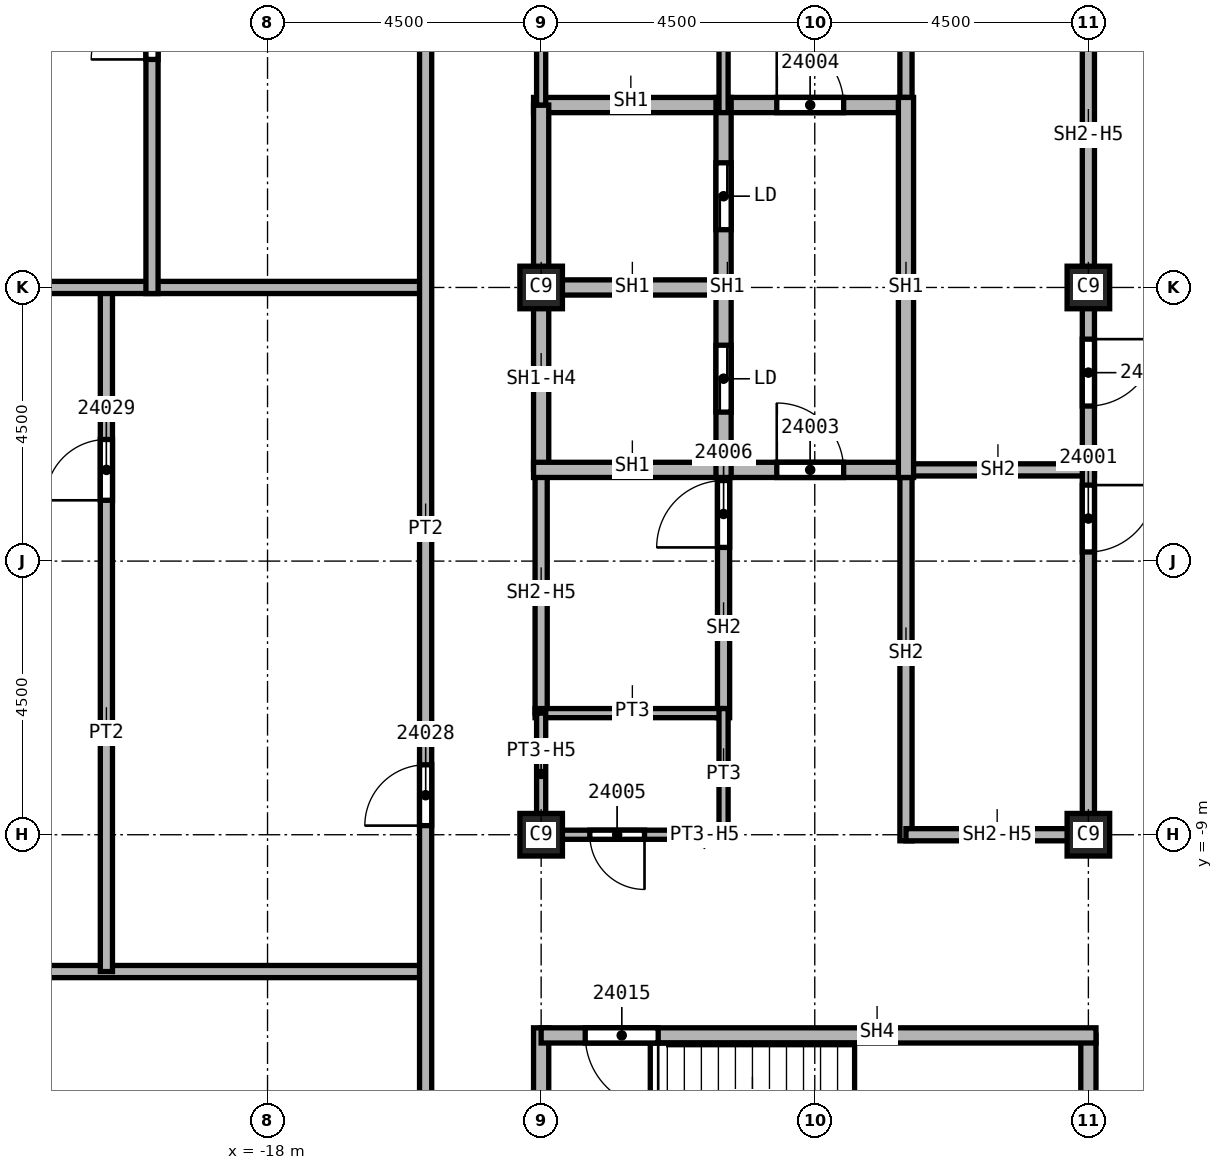
"""IFC4 building model, lengths in metres.
Left out: names, types, materials, properties, quantities, classifications, styles, units other than length and angle.
Written with IfcOpenShell. Run it as: python <this file> out.ifc"""

import sys

from ifc_helpers import new_model, si_unit, direction, frame, frame_2d, origin, origin_2d, place, context, subcontext, project, spatial, rectangle, extrude, element, fill, save


model = new_model("IFC4")
c1 = context("Model", 3, precision=1e-05, world=origin(), true_north=direction((0.0, 1.0)))
c2 = subcontext(c1, "Body", "Model", "MODEL_VIEW")
j1 = project(units=[si_unit("LENGTHUNIT", "METRE"), si_unit("PLANEANGLEUNIT", "RADIAN")], contexts=[c1])
p1 = place(None, origin())
s1 = spatial("IfcSite", under=j1, at=p1, CompositionType="ELEMENT")
p2 = place(p1, origin())
s2 = spatial("IfcBuilding", under=s1, at=p2, CompositionType="ELEMENT")
p3 = place(p2, frame((0.0, 0.0, 346.0)))
s3 = spatial("IfcBuildingStorey", under=s2, at=p3, CompositionType="ELEMENT", Elevation=346.0)
for number, where, z_axis, x_axis in (
    (1, (-4.5, 0.0, 0.0), (0.0, 0.0, 1.0), (1.0, 0.0, 0.0)),
    (2, (-4.5, -9.0, 0.0), (0.0, 0.0, 1.0), (1.0, 0.0, 0.0)),
    (3, (-13.5, 0.0, 0.0), (0.0, 0.0, 1.0), (1.0, 0.0, 0.0)),
    (4, (-13.5, -9.0, 0.0), (0.0, 0.0, 1.0), (1.0, 0.0, 0.0)),
):
    element("IfcColumn", number, at=place(p3, frame(where, z_axis=z_axis, x_axis=x_axis)), inside=s3, PredefinedType="COLUMN", context=c2, shape_type="SweptSolid", body=[
        extrude(rectangle(XDim=0.7, YDim=0.7, at=origin_2d()), origin(), (0.0, 0.0, 1.0), 3.59),
    ])
p4 = place(p3, frame((-26.55, -11.25, 0.0), z_axis=(0.0, 0.0, 1.0), x_axis=(1.0, 0.0, 0.0)))
e5 = element("IfcWall", 5, at=p4, inside=s3, PredefinedType="PARTITIONING", context=c2, shape_type="SweptSolid", body=[
    extrude(rectangle(XDim=11.15, YDim=0.2, at=frame_2d((5.575, 0.0))), origin(), (0.0, 0.0, 1.0), 3.59),
])
p5 = place(p3, frame((-20.65, -11.25, 0.0), z_axis=(0.0, 0.0, 1.0), x_axis=(0.0, 1.0, 0.0)))
e6 = element("IfcWall", 6, at=p5, inside=s3, PredefinedType="PARTITIONING", context=c2, shape_type="SweptSolid", body=[
    extrude(rectangle(XDim=11.25, YDim=0.2, at=frame_2d((5.625, 0.0))), origin(), (0.0, 0.0, 1.0), 3.59),
])
p6 = place(p5, frame((7.75, 0.0, 0.0)))
e7 = element("IfcOpeningElement", 7, at=p6, cuts=e6, PredefinedType="OPENING", context=c2, shape_type="SweptSolid", body=[
    extrude(rectangle(XDim=1.0, YDim=2.1, at=frame_2d((0.5, 1.05))), frame((0.0, 0.1, 0.0), z_axis=(0.0, -1.0, 0.0), x_axis=(1.0, 0.0, 0.0)), (0.0, 0.0, 1.0), 0.2),
])
p7 = place(p3, frame((-15.4, 0.0, 0.0), z_axis=(0.0, 0.0, 1.0), x_axis=(-1.0, 0.0, 0.0)))
e8 = element("IfcWall", 8, at=p7, inside=s3, PredefinedType="PARTITIONING", context=c2, shape_type="SweptSolid", body=[
    extrude(rectangle(XDim=11.15, YDim=0.2, at=frame_2d((5.575, 0.0))), origin(), (0.0, 0.0, 1.0), 3.59),
])
p8 = place(p3, frame((-19.9, -0.1, 0.0), z_axis=(0.0, 0.0, 1.0), x_axis=(0.0, 1.0, 0.0)))
e9 = element("IfcWall", 9, at=p8, inside=s3, PredefinedType="PARTITIONING", context=c2, shape_type="SweptSolid", body=[
    extrude(rectangle(XDim=13.6, YDim=0.2, at=frame_2d((6.8, 0.0))), origin(), (0.0, 0.0, 1.0), 3.59),
])
p9 = place(p8, frame((3.85, 0.0, 0.0)))
e10 = element("IfcOpeningElement", 10, at=p9, cuts=e9, PredefinedType="OPENING", context=c2, shape_type="SweptSolid", body=[
    extrude(rectangle(XDim=1.0, YDim=2.1, at=frame_2d((0.5, 1.05))), frame((0.0, 0.1, 0.0), z_axis=(0.0, -1.0, 0.0), x_axis=(1.0, 0.0, 0.0)), (0.0, 0.0, 1.0), 0.2),
])
p10 = place(p3, frame((-15.4, -24.95, 0.0), z_axis=(0.0, 0.0, 1.0), x_axis=(0.0, 1.0, 0.0)))
e11 = element("IfcWall", 11, at=p10, inside=s3, PredefinedType="PARTITIONING", context=c2, shape_type="SweptSolid", body=[
    extrude(rectangle(XDim=38.55, YDim=0.2, at=frame_2d((19.275, 0.0))), origin(), (0.0, 0.0, 1.0), 3.59),
])
p11 = place(p10, frame((30.5, 0.0, 0.0)))
e12 = element("IfcOpeningElement", 12, at=p11, cuts=e11, PredefinedType="OPENING", context=c2, shape_type="SweptSolid", body=[
    extrude(rectangle(XDim=1.0, YDim=2.1, at=frame_2d((0.5, 1.05))), frame((0.0, 0.1, 0.0), z_axis=(0.0, -1.0, 0.0), x_axis=(1.0, 0.0, 0.0)), (0.0, 0.0, 1.0), 0.2),
])
p12 = place(p10, frame((36.35, 0.0, 0.0)))
e13 = element("IfcOpeningElement", 13, at=p12, cuts=e11, PredefinedType="OPENING", context=c2, shape_type="SweptSolid", body=[
    extrude(rectangle(XDim=1.0, YDim=2.1, at=frame_2d((0.5, 1.05))), frame((0.0, 0.1, 0.0), z_axis=(0.0, -1.0, 0.0), x_axis=(1.0, 0.0, 0.0)), (0.0, 0.0, 1.0), 0.2),
])
p13 = place(p10, frame((1.9, 0.0, 0.0)))
e14 = element("IfcOpeningElement", 14, at=p13, cuts=e11, PredefinedType="OPENING", context=c2, shape_type="SweptSolid", body=[
    extrude(rectangle(XDim=1.0, YDim=2.1, at=frame_2d((0.5, 1.05))), frame((0.0, 0.1, 0.0), z_axis=(0.0, -1.0, 0.0), x_axis=(1.0, 0.0, 0.0)), (0.0, 0.0, 1.0), 0.2),
])
p14 = place(p10, frame((5.6, 0.0, 0.0)))
e15 = element("IfcOpeningElement", 15, at=p14, cuts=e11, PredefinedType="OPENING", context=c2, shape_type="SweptSolid", body=[
    extrude(rectangle(XDim=1.0, YDim=2.1, at=frame_2d((0.5, 1.05))), frame((0.0, 0.1, 0.0), z_axis=(0.0, -1.0, 0.0), x_axis=(1.0, 0.0, 0.0)), (0.0, 0.0, 1.0), 0.2),
])
p15 = place(p10, frame((9.35, 0.0, 0.0)))
e16 = element("IfcOpeningElement", 16, at=p15, cuts=e11, PredefinedType="OPENING", context=c2, shape_type="SweptSolid", body=[
    extrude(rectangle(XDim=1.0, YDim=2.1, at=frame_2d((0.5, 1.05))), frame((0.0, 0.1, 0.0), z_axis=(0.0, -1.0, 0.0), x_axis=(1.0, 0.0, 0.0)), (0.0, 0.0, 1.0), 0.2),
])
p16 = place(p10, frame((16.1, 0.0, 0.0)))
e17 = element("IfcOpeningElement", 17, at=p16, cuts=e11, PredefinedType="OPENING", context=c2, shape_type="SweptSolid", body=[
    extrude(rectangle(XDim=1.0, YDim=2.1, at=frame_2d((0.5, 1.05))), frame((0.0, 0.1, 0.0), z_axis=(0.0, -1.0, 0.0), x_axis=(1.0, 0.0, 0.0)), (0.0, 0.0, 1.0), 0.2),
])
p17 = place(p3, frame((-13.5, -7.0, 0.0), z_axis=(0.0, 0.0, 1.0), x_axis=(0.0, 1.0, 0.0)))
e18 = element("IfcWall", 18, at=p17, inside=s3, PredefinedType="SOLIDWALL", context=c2, shape_type="SweptSolid", body=[
    extrude(rectangle(XDim=4.0, YDim=0.2, at=frame_2d((2.0, 0.0))), origin(), (0.0, 0.0, 1.0), 2.828),
])
p18 = place(p3, frame((-10.5, -7.075, 0.0), z_axis=(0.0, 0.0, 1.0), x_axis=(0.0, 1.0, 0.0)))
e19 = element("IfcWall", 19, at=p18, inside=s3, PredefinedType="SOLIDWALL", context=c2, shape_type="SweptSolid", body=[
    extrude(rectangle(XDim=4.2, YDim=0.2, at=frame_2d((2.1, 0.0))), origin(), (0.0, 0.0, 1.0), 3.59),
])
p19 = place(p18, frame((2.8, 0.0, 0.0)))
e20 = element("IfcOpeningElement", 20, at=p19, cuts=e19, PredefinedType="OPENING", context=c2, shape_type="SweptSolid", body=[
    extrude(rectangle(XDim=1.1, YDim=2.1, at=frame_2d((0.55, 1.05))), frame((0.0, 0.1, 0.0), z_axis=(0.0, -1.0, 0.0), x_axis=(1.0, 0.0, 0.0)), (0.0, 0.0, 1.0), 0.2),
])
p20 = place(p3, frame((-7.625, -3.0, 0.0), z_axis=(0.0, 0.0, 1.0), x_axis=(1.0, 0.0, 0.0)))
e21 = element("IfcWall", 21, at=p20, inside=s3, PredefinedType="SOLIDWALL", context=c2, shape_type="SweptSolid", body=[
    extrude(rectangle(XDim=3.225, YDim=0.2, at=frame_2d((1.613, 0.0))), origin(), (0.0, 0.0, 1.0), 3.59),
])
p21 = place(p3, frame((-7.5, -9.1, 0.0), z_axis=(0.0, 0.0, 1.0), x_axis=(0.0, 1.0, 0.0)))
e22 = element("IfcWall", 22, at=p21, inside=s3, PredefinedType="SOLIDWALL", context=c2, shape_type="SweptSolid", body=[
    extrude(rectangle(XDim=6.225, YDim=0.2, at=frame_2d((3.113, 0.0))), origin(), (0.0, 0.0, 1.0), 3.59),
])
p22 = place(p3, frame((-7.5, 2.875, 0.0), z_axis=(0.0, 0.0, 1.0), x_axis=(0.0, 1.0, 0.0)))
e23 = element("IfcWall", 23, at=p22, inside=s3, PredefinedType="SOLIDWALL", context=c2, shape_type="SweptSolid", body=[
    extrude(rectangle(XDim=3.125, YDim=0.2, at=frame_2d((1.562, 0.0))), origin(), (0.0, 0.0, 1.0), 3.59),
])
p23 = place(p3, frame((-4.5, -9.0, 0.0), z_axis=(0.0, 0.0, 1.0), x_axis=(-1.0, 0.0, 0.0)))
e24 = element("IfcWall", 24, at=p23, inside=s3, PredefinedType="SOLIDWALL", context=c2, shape_type="SweptSolid", body=[
    extrude(rectangle(XDim=3.0, YDim=0.2, at=frame_2d((1.5, 0.0))), origin(), (0.0, 0.0, 1.0), 2.828),
])
p24 = place(p3, frame((-4.5, 6.0, 0.0), z_axis=(0.0, 0.0, 1.0), x_axis=(0.0, -1.0, 0.0)))
e25 = element("IfcWall", 25, at=p24, inside=s3, PredefinedType="SOLIDWALL", context=c2, shape_type="SweptSolid", body=[
    extrude(rectangle(XDim=15.1, YDim=0.2, at=frame_2d((7.55, 0.0))), origin(), (0.0, 0.0, 1.0), 2.828),
])
p25 = place(p24, frame((9.25, 0.0, 0.0)))
e26 = element("IfcOpeningElement", 26, at=p25, cuts=e25, PredefinedType="OPENING", context=c2, shape_type="SweptSolid", body=[
    extrude(rectangle(XDim=1.1, YDim=2.1, at=frame_2d((0.55, 1.05))), frame((0.0, 0.1, 0.0), z_axis=(0.0, -1.0, 0.0), x_axis=(1.0, 0.0, 0.0)), (0.0, 0.0, 1.0), 0.2),
])
p26 = place(p24, frame((6.85, 0.0, 0.0)))
e27 = element("IfcOpeningElement", 27, at=p26, cuts=e25, PredefinedType="OPENING", context=c2, shape_type="SweptSolid", body=[
    extrude(rectangle(XDim=1.1, YDim=2.1, at=frame_2d((0.55, 1.05))), frame((0.0, 0.1, 0.0), z_axis=(0.0, -1.0, 0.0), x_axis=(1.0, 0.0, 0.0)), (0.0, 0.0, 1.0), 0.2),
])
p27 = place(p3, frame((-13.625, 0.0, 0.0), z_axis=(0.0, 0.0, 1.0), x_axis=(1.0, 0.0, 0.0)))
e28 = element("IfcWall", 28, at=p27, inside=s3, PredefinedType="SOLIDWALL", context=c2, shape_type="SweptSolid", body=[
    extrude(rectangle(XDim=3.125, YDim=0.25, at=frame_2d((1.562, 0.0))), origin(), (0.0, 0.0, 1.0), 3.59),
])
p28 = place(p3, frame((-13.625, 3.0, 0.0), z_axis=(0.0, 0.0, 1.0), x_axis=(1.0, 0.0, 0.0)))
e29 = element("IfcWall", 29, at=p28, inside=s3, PredefinedType="SOLIDWALL", context=c2, shape_type="SweptSolid", body=[
    extrude(rectangle(XDim=6.125, YDim=0.25, at=frame_2d((3.062, 0.0))), origin(), (0.0, 0.0, 1.0), 3.59),
])
p29 = place(p28, frame((4.0, 0.0, 0.0)))
e30 = element("IfcOpeningElement", 30, at=p29, cuts=e29, PredefinedType="OPENING", context=c2, shape_type="SweptSolid", body=[
    extrude(rectangle(XDim=1.1, YDim=2.1, at=frame_2d((0.55, 1.05))), frame((0.0, 0.125, 0.0), z_axis=(0.0, -1.0, 0.0), x_axis=(1.0, 0.0, 0.0)), (0.0, 0.0, 1.0), 0.25),
])
p30 = place(p3, frame((-13.5, -3.0, 0.0), z_axis=(0.0, 0.0, 1.0), x_axis=(0.0, 1.0, 0.0)))
e31 = element("IfcWall", 31, at=p30, inside=s3, PredefinedType="SOLIDWALL", context=c2, shape_type="SweptSolid", body=[
    extrude(rectangle(XDim=6.0, YDim=0.25, at=frame_2d((3.0, 0.0))), origin(), (0.0, 0.0, 1.0), 2.828),
])
p31 = place(p3, frame((-13.625, -3.0, 0.0), z_axis=(0.0, 0.0, 1.0), x_axis=(1.0, 0.0, 0.0)))
e32 = element("IfcWall", 32, at=p31, inside=s3, PredefinedType="SOLIDWALL", context=c2, shape_type="SweptSolid", body=[
    extrude(rectangle(XDim=6.125, YDim=0.25, at=frame_2d((3.062, 0.0))), origin(), (0.0, 0.0, 1.0), 3.59),
])
p32 = place(p31, frame((4.0, 0.0, 0.0)))
e33 = element("IfcOpeningElement", 33, at=p32, cuts=e32, PredefinedType="OPENING", context=c2, shape_type="SweptSolid", body=[
    extrude(rectangle(XDim=1.1, YDim=2.1, at=frame_2d((0.55, 1.05))), frame((0.0, 0.125, 0.0), z_axis=(0.0, -1.0, 0.0), x_axis=(1.0, 0.0, 0.0)), (0.0, 0.0, 1.0), 0.25),
])
p33 = place(p3, frame((-10.5, -3.125, 0.0), z_axis=(0.0, 0.0, 1.0), x_axis=(0.0, 1.0, 0.0)))
e34 = element("IfcWall", 34, at=p33, inside=s3, PredefinedType="SOLIDWALL", context=c2, shape_type="SweptSolid", body=[
    extrude(rectangle(XDim=6.25, YDim=0.25, at=frame_2d((3.125, 0.0))), origin(), (0.0, 0.0, 1.0), 3.59),
])
p34 = place(p33, frame((1.075, 0.0, 0.0)))
e35 = element("IfcOpeningElement", 35, at=p34, cuts=e34, PredefinedType="OPENING", context=c2, shape_type="SweptSolid", body=[
    extrude(rectangle(XDim=1.1, YDim=2.1, at=frame_2d((0.55, 1.05))), frame((0.0, 0.125, 0.0), z_axis=(0.0, -1.0, 0.0), x_axis=(1.0, 0.0, 0.0)), (0.0, 0.0, 1.0), 0.25),
])
p35 = place(p33, frame((4.075, 0.0, 0.0)))
e36 = element("IfcOpeningElement", 36, at=p35, cuts=e34, PredefinedType="OPENING", context=c2, shape_type="SweptSolid", body=[
    extrude(rectangle(XDim=1.1, YDim=2.1, at=frame_2d((0.55, 1.05))), frame((0.0, 0.125, 0.0), z_axis=(0.0, -1.0, 0.0), x_axis=(1.0, 0.0, 0.0)), (0.0, 0.0, 1.0), 0.25),
])
p36 = place(p3, frame((-7.5, -3.125, 0.0), z_axis=(0.0, 0.0, 1.0), x_axis=(0.0, 1.0, 0.0)))
e37 = element("IfcWall", 37, at=p36, inside=s3, PredefinedType="SOLIDWALL", context=c2, shape_type="SweptSolid", body=[
    extrude(rectangle(XDim=6.25, YDim=0.25, at=frame_2d((3.125, 0.0))), origin(), (0.0, 0.0, 1.0), 3.59),
])
p37 = place(p3, frame((-13.5, -12.175, 0.0), z_axis=(0.0, 0.0, 1.0), x_axis=(0.0, -1.0, 0.0)))
e38 = element("IfcWall", 38, at=p37, inside=s3, PredefinedType="SOLIDWALL", context=c2, shape_type="SweptSolid", body=[
    extrude(rectangle(XDim=4.75, YDim=0.25, at=frame_2d((2.375, 0.0))), origin(), (0.0, 0.0, 1.0), 3.59),
])
p38 = place(p3, frame((-4.5, -12.3, 0.0), z_axis=(0.0, 0.0, 1.0), x_axis=(0.0, -1.0, 0.0)))
e39 = element("IfcWall", 39, at=p38, inside=s3, PredefinedType="SOLIDWALL", context=c2, shape_type="SweptSolid", body=[
    extrude(rectangle(XDim=4.625, YDim=0.25, at=frame_2d((2.312, 0.0))), origin(), (0.0, 0.0, 1.0), 3.59),
])
p39 = place(p3, frame((-4.375, -12.3, 0.0), z_axis=(0.0, 0.0, 1.0), x_axis=(-1.0, 0.0, 0.0)))
e40 = element("IfcWall", 40, at=p39, inside=s3, PredefinedType="SOLIDWALL", context=c2, shape_type="SweptSolid", body=[
    extrude(rectangle(XDim=9.125, YDim=0.25, at=frame_2d((4.562, 0.0))), origin(), (0.0, 0.0, 1.0), 3.59),
])
p40 = place(p39, frame((7.2, 0.0, 0.0)))
e41 = element("IfcOpeningElement", 41, at=p40, cuts=e40, PredefinedType="OPENING", context=c2, shape_type="SweptSolid", body=[
    extrude(rectangle(XDim=1.2, YDim=2.1, at=frame_2d((0.6, 1.05))), frame((0.0, 0.125, 0.0), z_axis=(0.0, -1.0, 0.0), x_axis=(1.0, 0.0, 0.0)), (0.0, 0.0, 1.0), 0.25),
])
p41 = place(p3, frame((-13.6, -7.0, 0.0), z_axis=(0.0, 0.0, 1.0), x_axis=(1.0, 0.0, 0.0)))
e42 = element("IfcWall", 42, at=p41, inside=s3, PredefinedType="PARTITIONING", context=c2, shape_type="SweptSolid", body=[
    extrude(rectangle(XDim=3.1, YDim=0.15, at=frame_2d((1.55, 0.0))), origin(), (0.0, 0.0, 1.0), 3.59),
])
p42 = place(p3, frame((-13.5, -9.075, 0.0), z_axis=(0.0, 0.0, 1.0), x_axis=(0.0, 1.0, 0.0)))
e43 = element("IfcWall", 43, at=p42, inside=s3, PredefinedType="PARTITIONING", context=c2, shape_type="SweptSolid", body=[
    extrude(rectangle(XDim=2.075, YDim=0.15, at=frame_2d((1.038, 0.0))), origin(), (0.0, 0.0, 1.0), 2.828),
])
p43 = place(p3, frame((-13.5, 3.0, 0.0), z_axis=(0.0, 0.0, 1.0), x_axis=(0.0, 1.0, 0.0)))
e44 = element("IfcWall", 44, at=p43, inside=s3, PredefinedType="PARTITIONING", context=c2, shape_type="SweptSolid", body=[
    extrude(rectangle(XDim=6.075, YDim=0.15, at=frame_2d((3.038, 0.0))), origin(), (0.0, 0.0, 1.0), 2.828),
])
p44 = place(p3, frame((-10.5, -9.075, 0.0), z_axis=(0.0, 0.0, 1.0), x_axis=(0.0, 1.0, 0.0)))
e45 = element("IfcWall", 45, at=p44, inside=s3, PredefinedType="PARTITIONING", context=c2, shape_type="SweptSolid", body=[
    extrude(rectangle(XDim=2.15, YDim=0.15, at=frame_2d((1.075, 0.0))), origin(), (0.0, 0.0, 1.0), 3.59),
])
p45 = place(p3, frame((-10.5, -9.0, 0.0), z_axis=(0.0, 0.0, 1.0), x_axis=(-1.0, 0.0, 0.0)))
e46 = element("IfcWall", 46, at=p45, inside=s3, PredefinedType="PARTITIONING", context=c2, shape_type="SweptSolid", body=[
    extrude(rectangle(XDim=3.0, YDim=0.15, at=frame_2d((1.5, 0.0))), origin(), (0.0, 0.0, 1.0), 2.828),
])
p46 = place(p45, frame((1.3, 0.0, 0.0)))
e47 = element("IfcOpeningElement", 47, at=p46, cuts=e46, PredefinedType="OPENING", context=c2, shape_type="SweptSolid", body=[
    extrude(rectangle(XDim=0.9, YDim=2.1, at=frame_2d((0.45, 1.05))), frame((0.0, 0.075, 0.0), z_axis=(0.0, -1.0, 0.0), x_axis=(1.0, 0.0, 0.0)), (0.0, 0.0, 1.0), 0.15),
])
p47 = place(p3, frame((-10.5, 2.875, 0.0), z_axis=(0.0, 0.0, 1.0), x_axis=(0.0, 1.0, 0.0)))
e48 = element("IfcWall", 48, at=p47, inside=s3, PredefinedType="PARTITIONING", context=c2, shape_type="SweptSolid", body=[
    extrude(rectangle(XDim=6.2, YDim=0.15, at=frame_2d((3.1, 0.0))), origin(), (0.0, 0.0, 1.0), 3.59),
])
p48 = place(p47, frame((3.55, 0.0, 0.0)))
e49 = element("IfcOpeningElement", 49, at=p48, cuts=e48, PredefinedType="OPENING", context=c2, shape_type="SweptSolid", body=[
    extrude(rectangle(XDim=0.9, YDim=2.1, at=frame_2d((0.45, 1.05))), frame((0.0, 0.075, 0.0), z_axis=(0.0, -1.0, 0.0), x_axis=(1.0, 0.0, 0.0)), (0.0, 0.0, 1.0), 0.15),
])
p49 = place(p25, origin())
e50 = element("IfcDoor", 50, at=p49, inside=s3, OperationType="SINGLE_SWING_RIGHT", PredefinedType="DOOR", context=c2, shape_type="SweptSolid", body=[
    extrude(rectangle(XDim=1.1, YDim=2.1, at=frame_2d((0.55, 1.05))), frame((0.0, 0.025, 0.0), z_axis=(0.0, -1.0, 0.0), x_axis=(1.0, 0.0, 0.0)), (0.0, 0.0, 1.0), 0.05),
])
fill(e26, e50)
p50 = place(p26, origin())
e51 = element("IfcDoor", 51, at=p50, inside=s3, OperationType="SINGLE_SWING_LEFT", PredefinedType="DOOR", context=c2, shape_type="SweptSolid", body=[
    extrude(rectangle(XDim=1.1, YDim=2.1, at=frame_2d((0.55, 1.05))), frame((0.0, 0.025, 0.0), z_axis=(0.0, -1.0, 0.0), x_axis=(1.0, 0.0, 0.0)), (0.0, 0.0, 1.0), 0.05),
])
fill(e27, e51)
p51 = place(p32, origin())
e52 = element("IfcDoor", 52, at=p51, inside=s3, OperationType="SINGLE_SWING_RIGHT", PredefinedType="DOOR", context=c2, shape_type="SweptSolid", body=[
    extrude(rectangle(XDim=1.1, YDim=2.1, at=frame_2d((0.55, 1.05))), frame((0.0, 0.025, 0.0), z_axis=(0.0, -1.0, 0.0), x_axis=(1.0, 0.0, 0.0)), (0.0, 0.0, 1.0), 0.05),
])
fill(e33, e52)
p52 = place(p29, origin())
e53 = element("IfcDoor", 53, at=p52, inside=s3, OperationType="SINGLE_SWING_LEFT", PredefinedType="DOOR", context=c2, shape_type="SweptSolid", body=[
    extrude(rectangle(XDim=1.1, YDim=2.1, at=frame_2d((0.55, 1.05))), frame((0.0, 0.025, 0.0), z_axis=(0.0, -1.0, 0.0), x_axis=(1.0, 0.0, 0.0)), (0.0, 0.0, 1.0), 0.05),
])
fill(e30, e53)
p53 = place(p46, origin())
e54 = element("IfcDoor", 54, at=p53, inside=s3, OperationType="SINGLE_SWING_RIGHT", PredefinedType="DOOR", context=c2, shape_type="SweptSolid", body=[
    extrude(rectangle(XDim=0.9, YDim=2.1, at=frame_2d((0.45, 1.05))), frame((0.0, 0.025, 0.0), z_axis=(0.0, -1.0, 0.0), x_axis=(1.0, 0.0, 0.0)), (0.0, 0.0, 1.0), 0.05),
])
fill(e47, e54)
p54 = place(p19, origin())
e55 = element("IfcDoor", 55, at=p54, inside=s3, OperationType="SINGLE_SWING_LEFT", PredefinedType="DOOR", context=c2, shape_type="SweptSolid", body=[
    extrude(rectangle(XDim=1.1, YDim=2.1, at=frame_2d((0.55, 1.05))), frame((0.0, 0.025, 0.0), z_axis=(0.0, -1.0, 0.0), x_axis=(1.0, 0.0, 0.0)), (0.0, 0.0, 1.0), 0.05),
])
fill(e20, e55)
p55 = place(p40, origin())
e56 = element("IfcDoor", 56, at=p55, inside=s3, OperationType="SINGLE_SWING_RIGHT", PredefinedType="DOOR", context=c2, shape_type="SweptSolid", body=[
    extrude(rectangle(XDim=1.2, YDim=2.1, at=frame_2d((0.6, 1.05))), frame((0.0, 0.025, 0.0), z_axis=(0.0, -1.0, 0.0), x_axis=(1.0, 0.0, 0.0)), (0.0, 0.0, 1.0), 0.05),
])
fill(e41, e56)
p56 = place(p9, origin())
e57 = element("IfcDoor", 57, at=p56, inside=s3, OperationType="SINGLE_SWING_LEFT", PredefinedType="DOOR", context=c2, shape_type="SweptSolid", body=[
    extrude(rectangle(XDim=1.0, YDim=2.1, at=frame_2d((0.5, 1.05))), frame((0.0, 0.025, 0.0), z_axis=(0.0, -1.0, 0.0), x_axis=(1.0, 0.0, 0.0)), (0.0, 0.0, 1.0), 0.05),
])
fill(e10, e57)
p57 = place(p16, origin())
e58 = element("IfcDoor", 58, at=p57, inside=s3, OperationType="SINGLE_SWING_LEFT", PredefinedType="DOOR", context=c2, shape_type="SweptSolid", body=[
    extrude(rectangle(XDim=1.0, YDim=2.1, at=frame_2d((0.5, 1.05))), frame((0.0, 0.025, 0.0), z_axis=(0.0, -1.0, 0.0), x_axis=(1.0, 0.0, 0.0)), (0.0, 0.0, 1.0), 0.05),
])
fill(e17, e58)
p58 = place(p6, origin())
e59 = element("IfcDoor", 59, at=p58, inside=s3, OperationType="SINGLE_SWING_RIGHT", PredefinedType="DOOR", context=c2, shape_type="SweptSolid", body=[
    extrude(rectangle(XDim=1.0, YDim=2.1, at=frame_2d((0.5, 1.05))), frame((0.0, 0.025, 0.0), z_axis=(0.0, -1.0, 0.0), x_axis=(1.0, 0.0, 0.0)), (0.0, 0.0, 1.0), 0.05),
])
fill(e7, e59)
p59 = place(p34, origin())
e60 = element("IfcDoor", 60, at=p59, inside=s3, OperationType="SLIDING_TO_LEFT", PredefinedType="DOOR", context=c2, shape_type="SweptSolid", body=[
    extrude(rectangle(XDim=1.1, YDim=2.1, at=frame_2d((0.55, 1.05))), frame((0.0, 0.025, 0.0), z_axis=(0.0, -1.0, 0.0), x_axis=(1.0, 0.0, 0.0)), (0.0, 0.0, 1.0), 0.05),
])
fill(e35, e60)
p60 = place(p35, origin())
e61 = element("IfcDoor", 61, at=p60, inside=s3, OperationType="SLIDING_TO_LEFT", PredefinedType="DOOR", context=c2, shape_type="SweptSolid", body=[
    extrude(rectangle(XDim=1.1, YDim=2.1, at=frame_2d((0.55, 1.05))), frame((0.0, 0.025, 0.0), z_axis=(0.0, -1.0, 0.0), x_axis=(1.0, 0.0, 0.0)), (0.0, 0.0, 1.0), 0.05),
])
fill(e36, e61)
save(model, sys.argv[1])
